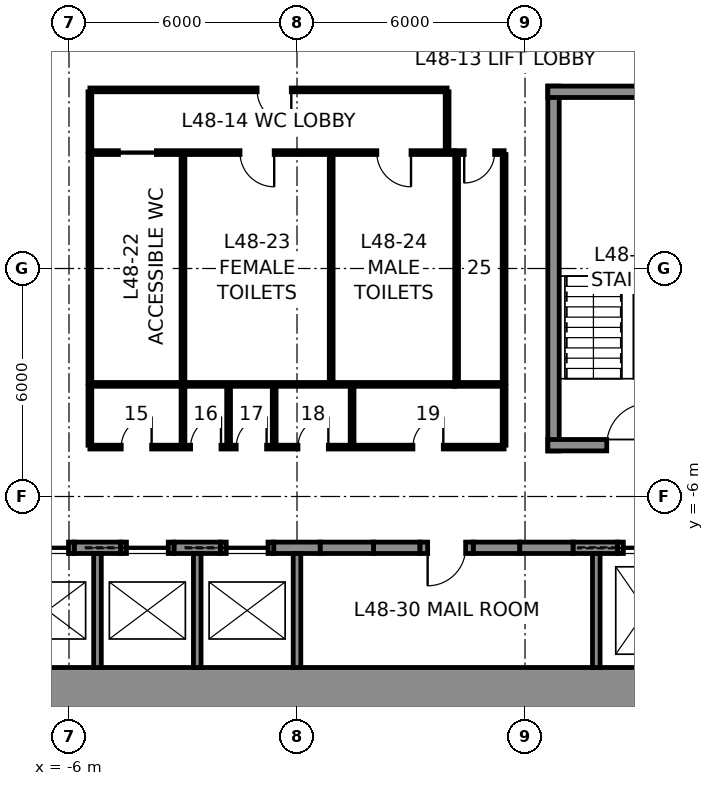
"""IFC4 building model, lengths in metres.
Left out: names, types, materials, properties, quantities, classifications, styles, units other than length and angle.
Written with IfcOpenShell. Run it as: python <this file> out.ifc"""

import sys

from ifc_helpers import new_model, si_unit, direction, frame, frame_2d, origin, place, context, subcontext, project, spatial, rectangle, extrude, element, fill, save


model = new_model("IFC4")
c1 = context("Model", 3, precision=1e-05, world=origin(), true_north=direction((0.0, 1.0)))
c2 = subcontext(c1, "Body", "Model", "MODEL_VIEW")
j1 = project(units=[si_unit("LENGTHUNIT", "METRE"), si_unit("PLANEANGLEUNIT", "RADIAN")], contexts=[c1])
p1 = place(None, origin())
s1 = spatial("IfcSite", under=j1, at=p1, CompositionType="ELEMENT")
p2 = place(p1, origin())
s2 = spatial("IfcBuilding", under=s1, at=p2, CompositionType="ELEMENT")
p3 = place(p2, frame((0.0, 0.0, 221.8)))
s3 = spatial("IfcBuildingStorey", under=s2, at=p3, CompositionType="ELEMENT", Elevation=221.8)
p4 = place(p3, frame((12.0, -11.25, 0.0), z_axis=(0.0, 0.0, 1.0), x_axis=(-1.0, 0.0, 0.0)))
e1 = element("IfcWall", 1, at=p4, inside=s3, PredefinedType="SHEAR", context=c2, shape_type="SweptSolid", body=[
    extrude(rectangle(XDim=24.0, YDim=1.5, at=frame_2d((12.0, 0.0))), origin(), (0.0, 0.0, 1.0), 4.0),
])
for number, where, z_axis, x_axis in (
    (2, (-5.863, -7.35, 0.0), (0.0, 0.0, 1.0), (1.0, 0.0, 0.0)),
    (3, (-3.238, -7.35, 0.0), (0.0, 0.0, 1.0), (1.0, 0.0, 0.0)),
    (4, (-0.613, -7.35, 0.0), (0.0, 0.0, 1.0), (1.0, 0.0, 0.0)),
    (5, (2.012, -7.35, 0.0), (0.0, 0.0, 1.0), (1.0, 0.0, 0.0)),
    (6, (4.637, -7.35, 0.0), (0.0, 0.0, 1.0), (1.0, 0.0, 0.0)),
):
    element("IfcWall", number, at=place(p3, frame(where, z_axis=z_axis, x_axis=x_axis)), inside=s3, PredefinedType="SHEAR", context=c2, shape_type="SweptSolid", body=[
        extrude(rectangle(XDim=1.225, YDim=0.3, at=frame_2d((0.613, 0.0))), origin(), (0.0, 0.0, 1.0), 4.0),
    ])
p5 = place(p3, frame((7.262, -7.35, 0.0), z_axis=(0.0, 0.0, 1.0), x_axis=(1.0, 0.0, 0.0)))
e7 = element("IfcWall", 7, at=p5, inside=s3, PredefinedType="SHEAR", context=c2, shape_type="SweptSolid", body=[
    extrude(rectangle(XDim=1.175, YDim=0.3, at=frame_2d((0.587, 0.0))), origin(), (0.0, 0.0, 1.0), 4.0),
])
p6 = place(p3, frame((-7.262, -7.35, 0.0), z_axis=(0.0, 0.0, 1.0), x_axis=(1.0, 0.0, 0.0)))
e8 = element("IfcWall", 8, at=p6, inside=s3, PredefinedType="PARTITIONING", context=c2, shape_type="SweptSolid", body=[
    extrude(rectangle(XDim=1.4, YDim=0.3, at=frame_2d((0.7, 0.0))), origin(), (0.0, 0.0, 1.0), 4.0),
])
p7 = place(p6, frame((0.15, 0.0, 0.0)))
e9 = element("IfcOpeningElement", 9, at=p7, cuts=e8, PredefinedType="OPENING", context=c2, shape_type="SweptSolid", body=[
    extrude(rectangle(XDim=1.1, YDim=2.3, at=frame_2d((0.55, 1.15))), frame((0.0, 0.16, 0.0), z_axis=(0.0, -1.0, 0.0), x_axis=(1.0, 0.0, 0.0)), (0.0, 0.0, 1.0), 0.32),
])
p8 = place(p3, frame((-4.637, -7.35, 0.0), z_axis=(0.0, 0.0, 1.0), x_axis=(1.0, 0.0, 0.0)))
e10 = element("IfcWall", 10, at=p8, inside=s3, PredefinedType="PARTITIONING", context=c2, shape_type="SweptSolid", body=[
    extrude(rectangle(XDim=1.4, YDim=0.3, at=frame_2d((0.7, 0.0))), origin(), (0.0, 0.0, 1.0), 4.0),
])
p9 = place(p8, frame((0.15, 0.0, 0.0)))
e11 = element("IfcOpeningElement", 11, at=p9, cuts=e10, PredefinedType="OPENING", context=c2, shape_type="SweptSolid", body=[
    extrude(rectangle(XDim=1.1, YDim=2.3, at=frame_2d((0.55, 1.15))), frame((0.0, 0.16, 0.0), z_axis=(0.0, -1.0, 0.0), x_axis=(1.0, 0.0, 0.0)), (0.0, 0.0, 1.0), 0.32),
])
p10 = place(p3, frame((-2.012, -7.35, 0.0), z_axis=(0.0, 0.0, 1.0), x_axis=(1.0, 0.0, 0.0)))
e12 = element("IfcWall", 12, at=p10, inside=s3, PredefinedType="PARTITIONING", context=c2, shape_type="SweptSolid", body=[
    extrude(rectangle(XDim=1.4, YDim=0.3, at=frame_2d((0.7, 0.0))), origin(), (0.0, 0.0, 1.0), 4.0),
])
p11 = place(p10, frame((0.15, 0.0, 0.0)))
e13 = element("IfcOpeningElement", 13, at=p11, cuts=e12, PredefinedType="OPENING", context=c2, shape_type="SweptSolid", body=[
    extrude(rectangle(XDim=1.1, YDim=2.3, at=frame_2d((0.55, 1.15))), frame((0.0, 0.16, 0.0), z_axis=(0.0, -1.0, 0.0), x_axis=(1.0, 0.0, 0.0)), (0.0, 0.0, 1.0), 0.32),
])
p12 = place(p3, frame((0.613, -7.35, 0.0), z_axis=(0.0, 0.0, 1.0), x_axis=(1.0, 0.0, 0.0)))
e14 = element("IfcWall", 14, at=p12, inside=s3, PredefinedType="PARTITIONING", context=c2, shape_type="SweptSolid", body=[
    extrude(rectangle(XDim=1.4, YDim=0.3, at=frame_2d((0.7, 0.0))), origin(), (0.0, 0.0, 1.0), 4.0),
])
p13 = place(p3, frame((3.238, -7.35, 0.0), z_axis=(0.0, 0.0, 1.0), x_axis=(1.0, 0.0, 0.0)))
e15 = element("IfcWall", 15, at=p13, inside=s3, PredefinedType="PARTITIONING", context=c2, shape_type="SweptSolid", body=[
    extrude(rectangle(XDim=1.4, YDim=0.3, at=frame_2d((0.7, 0.0))), origin(), (0.0, 0.0, 1.0), 4.0),
])
p14 = place(p13, frame((0.2, 0.0, 0.0)))
e16 = element("IfcOpeningElement", 16, at=p14, cuts=e15, PredefinedType="OPENING", context=c2, shape_type="SweptSolid", body=[
    extrude(rectangle(XDim=1.0, YDim=2.3, at=frame_2d((0.5, 1.15))), frame((0.0, 0.16, 0.0), z_axis=(0.0, -1.0, 0.0), x_axis=(1.0, 0.0, 0.0)), (0.0, 0.0, 1.0), 0.32),
])
p15 = place(p3, frame((5.863, -7.35, 0.0), z_axis=(0.0, 0.0, 1.0), x_axis=(1.0, 0.0, 0.0)))
e17 = element("IfcWall", 17, at=p15, inside=s3, PredefinedType="PARTITIONING", context=c2, shape_type="SweptSolid", body=[
    extrude(rectangle(XDim=1.4, YDim=0.3, at=frame_2d((0.7, 0.0))), origin(), (0.0, 0.0, 1.0), 4.0),
])
p16 = place(p3, frame((8.438, -7.35, 0.0), z_axis=(0.0, 0.0, 1.0), x_axis=(1.0, 0.0, 0.0)))
e18 = element("IfcWall", 18, at=p16, inside=s3, PredefinedType="PARTITIONING", context=c2, shape_type="SweptSolid", body=[
    extrude(rectangle(XDim=1.5, YDim=0.3, at=frame_2d((0.75, 0.0))), origin(), (0.0, 0.0, 1.0), 4.0),
])
p17 = place(p16, frame((0.15, 0.0, 0.0)))
e19 = element("IfcOpeningElement", 19, at=p17, cuts=e18, PredefinedType="OPENING", context=c2, shape_type="SweptSolid", body=[
    extrude(rectangle(XDim=1.2, YDim=2.3, at=frame_2d((0.6, 1.15))), frame((0.0, 0.16, 0.0), z_axis=(0.0, -1.0, 0.0), x_axis=(1.0, 0.0, 0.0)), (0.0, 0.0, 1.0), 0.32),
])
for number, where, z_axis, x_axis in (
    (20, (-5.25, -10.5, 0.0), (0.0, 0.0, 1.0), (0.0, 1.0, 0.0)),
    (21, (-2.625, -10.5, 0.0), (0.0, 0.0, 1.0), (0.0, 1.0, 0.0)),
    (22, (0.0, -10.5, 0.0), (0.0, 0.0, 1.0), (0.0, 1.0, 0.0)),
    (23, (7.875, -10.5, 0.0), (0.0, 0.0, 1.0), (0.0, 1.0, 0.0)),
):
    element("IfcWall", number, at=place(p3, frame(where, z_axis=z_axis, x_axis=x_axis)), inside=s3, PredefinedType="PARTITIONING", context=c2, shape_type="SweptSolid", body=[
        extrude(rectangle(XDim=3.0, YDim=0.2, at=frame_2d((1.5, 0.0))), origin(), (0.0, 0.0, 1.0), 4.0),
    ])
p18 = place(p3, frame((6.75, -4.8, 0.0), z_axis=(0.0, 0.0, 1.0), x_axis=(0.0, 1.0, 0.0)))
e24 = element("IfcWall", 24, at=p18, inside=s3, PredefinedType="SOLIDWALL", context=c2, shape_type="SweptSolid", body=[
    extrude(rectangle(XDim=9.6, YDim=0.3, at=frame_2d((4.8, 0.0))), origin(), (0.0, 0.0, 1.0), 3.75),
])
p19 = place(p3, frame((6.6, 4.65, 0.0), z_axis=(0.0, 0.0, 1.0), x_axis=(1.0, 0.0, 0.0)))
e25 = element("IfcWall", 25, at=p19, inside=s3, PredefinedType="SOLIDWALL", context=c2, shape_type="SweptSolid", body=[
    extrude(rectangle(XDim=3.9, YDim=0.3, at=frame_2d((1.95, 0.0))), origin(), (0.0, 0.0, 1.0), 3.75),
])
p20 = place(p3, frame((10.5, -4.65, 0.0), z_axis=(0.0, 0.0, 1.0), x_axis=(-1.0, 0.0, 0.0)))
e26 = element("IfcWall", 26, at=p20, inside=s3, PredefinedType="SOLIDWALL", context=c2, shape_type="SweptSolid", body=[
    extrude(rectangle(XDim=3.9, YDim=0.3, at=frame_2d((1.95, 0.0))), origin(), (0.0, 0.0, 1.0), 3.75),
])
p21 = place(p20, frame((1.25, 0.0, 0.0)))
e27 = element("IfcOpeningElement", 27, at=p21, cuts=e26, PredefinedType="OPENING", context=c2, shape_type="SweptSolid", body=[
    extrude(rectangle(XDim=1.1, YDim=2.3, at=frame_2d((0.55, 1.15))), frame((0.0, 0.16, 0.0), z_axis=(0.0, -1.0, 0.0), x_axis=(1.0, 0.0, 0.0)), (0.0, 0.0, 1.0), 0.32),
])
p22 = place(p3, frame((-5.45, 3.05, 0.0), z_axis=(0.0, 0.0, 1.0), x_axis=(1.0, 0.0, 0.0)))
e28 = element("IfcWall", 28, at=p22, inside=s3, PredefinedType="PARTITIONING", context=c2, shape_type="SweptSolid", body=[
    extrude(rectangle(XDim=9.6, YDim=0.1, at=frame_2d((4.8, 0.0))), origin(), (0.0, 0.0, 1.0), 3.75),
])
p23 = place(p22, frame((0.75, 0.0, 0.0)))
e29 = element("IfcOpeningElement", 29, at=p23, cuts=e28, PredefinedType="OPENING", context=c2, shape_type="SweptSolid", body=[
    extrude(rectangle(XDim=1.0, YDim=2.3, at=frame_2d((0.5, 1.15))), frame((0.0, 0.06, 0.0), z_axis=(0.0, -1.0, 0.0), x_axis=(1.0, 0.0, 0.0)), (0.0, 0.0, 1.0), 0.12),
])
p24 = place(p22, frame((3.95, 0.0, 0.0)))
e30 = element("IfcOpeningElement", 30, at=p24, cuts=e28, PredefinedType="OPENING", context=c2, shape_type="SweptSolid", body=[
    extrude(rectangle(XDim=0.9, YDim=2.3, at=frame_2d((0.45, 1.15))), frame((0.0, 0.06, 0.0), z_axis=(0.0, -1.0, 0.0), x_axis=(1.0, 0.0, 0.0)), (0.0, 0.0, 1.0), 0.12),
])
p25 = place(p22, frame((7.55, 0.0, 0.0)))
e31 = element("IfcOpeningElement", 31, at=p25, cuts=e28, PredefinedType="OPENING", context=c2, shape_type="SweptSolid", body=[
    extrude(rectangle(XDim=0.9, YDim=2.3, at=frame_2d((0.45, 1.15))), frame((0.0, 0.06, 0.0), z_axis=(0.0, -1.0, 0.0), x_axis=(1.0, 0.0, 0.0)), (0.0, 0.0, 1.0), 0.12),
])
p26 = place(p3, frame((4.15, 3.05, 0.0), z_axis=(0.0, 0.0, 1.0), x_axis=(1.0, 0.0, 0.0)))
e32 = element("IfcWall", 32, at=p26, inside=s3, PredefinedType="PARTITIONING", context=c2, shape_type="SweptSolid", body=[
    extrude(rectangle(XDim=1.3, YDim=0.1, at=frame_2d((0.65, 0.0))), origin(), (0.0, 0.0, 1.0), 3.75),
])
p27 = place(p26, frame((0.25, 0.0, 0.0)))
e33 = element("IfcOpeningElement", 33, at=p27, cuts=e32, PredefinedType="OPENING", context=c2, shape_type="SweptSolid", body=[
    extrude(rectangle(XDim=0.8, YDim=2.3, at=frame_2d((0.4, 1.15))), frame((0.0, 0.06, 0.0), z_axis=(0.0, -1.0, 0.0), x_axis=(1.0, 0.0, 0.0)), (0.0, 0.0, 1.0), 0.12),
])
p28 = place(p3, frame((4.15, -3.05, 0.0), z_axis=(0.0, 0.0, 1.0), x_axis=(-1.0, 0.0, 0.0)))
e34 = element("IfcWall", 34, at=p28, inside=s3, PredefinedType="PARTITIONING", context=c2, shape_type="SweptSolid", body=[
    extrude(rectangle(XDim=9.6, YDim=0.1, at=frame_2d((4.8, 0.0))), origin(), (0.0, 0.0, 1.0), 3.75),
])
p29 = place(p3, frame((5.45, -3.05, 0.0), z_axis=(0.0, 0.0, 1.0), x_axis=(-1.0, 0.0, 0.0)))
e35 = element("IfcWall", 35, at=p29, inside=s3, PredefinedType="PARTITIONING", context=c2, shape_type="SweptSolid", body=[
    extrude(rectangle(XDim=1.3, YDim=0.1, at=frame_2d((0.65, 0.0))), origin(), (0.0, 0.0, 1.0), 3.75),
])
for number, where, z_axis, x_axis in (
    (36, (5.45, 3.0, 0.0), (0.0, 0.0, 1.0), (0.0, -1.0, 0.0)),
    (37, (-5.45, -3.0, 0.0), (0.0, 0.0, 1.0), (0.0, 1.0, 0.0)),
    (38, (-3.0, -3.0, 0.0), (0.0, 0.0, 1.0), (0.0, 1.0, 0.0)),
    (39, (0.9, -3.0, 0.0), (0.0, 0.0, 1.0), (0.0, 1.0, 0.0)),
    (40, (4.2, -3.0, 0.0), (0.0, 0.0, 1.0), (0.0, 1.0, 0.0)),
):
    element("IfcWall", number, at=place(p3, frame(where, z_axis=z_axis, x_axis=x_axis)), inside=s3, PredefinedType="PARTITIONING", context=c2, shape_type="SweptSolid", body=[
        extrude(rectangle(XDim=6.0, YDim=0.1, at=frame_2d((3.0, 0.0))), origin(), (0.0, 0.0, 1.0), 3.75),
    ])
p30 = place(p3, frame((-5.45, 4.7, 0.0), z_axis=(0.0, 0.0, 1.0), x_axis=(1.0, 0.0, 0.0)))
e41 = element("IfcWall", 41, at=p30, inside=s3, PredefinedType="PARTITIONING", context=c2, shape_type="SweptSolid", body=[
    extrude(rectangle(XDim=9.4, YDim=0.1, at=frame_2d((4.7, 0.0))), origin(), (0.0, 0.0, 1.0), 3.75),
])
p31 = place(p30, frame((4.4, 0.0, 0.0)))
e42 = element("IfcOpeningElement", 42, at=p31, cuts=e41, PredefinedType="OPENING", context=c2, shape_type="SweptSolid", body=[
    extrude(rectangle(XDim=0.9, YDim=2.3, at=frame_2d((0.45, 1.15))), frame((0.0, 0.06, 0.0), z_axis=(0.0, -1.0, 0.0), x_axis=(1.0, 0.0, 0.0)), (0.0, 0.0, 1.0), 0.12),
])
for number, where, z_axis, x_axis in (
    (43, (-5.45, 3.1, 0.0), (0.0, 0.0, 1.0), (0.0, 1.0, 0.0)),
    (44, (3.95, 3.1, 0.0), (0.0, 0.0, 1.0), (0.0, 1.0, 0.0)),
):
    element("IfcWall", number, at=place(p3, frame(where, z_axis=z_axis, x_axis=x_axis)), inside=s3, PredefinedType="PARTITIONING", context=c2, shape_type="SweptSolid", body=[
        extrude(rectangle(XDim=1.55, YDim=0.1, at=frame_2d((0.775, 0.0))), origin(), (0.0, 0.0, 1.0), 3.75),
    ])
p32 = place(p3, frame((5.45, -4.7, 0.0), z_axis=(0.0, 0.0, 1.0), x_axis=(-1.0, 0.0, 0.0)))
e45 = element("IfcWall", 45, at=p32, inside=s3, PredefinedType="PARTITIONING", context=c2, shape_type="SweptSolid", body=[
    extrude(rectangle(XDim=10.9, YDim=0.1, at=frame_2d((5.45, 0.0))), origin(), (0.0, 0.0, 1.0), 3.75),
])
p33 = place(p32, frame((9.275, 0.0, 0.0)))
e46 = element("IfcOpeningElement", 46, at=p33, cuts=e45, PredefinedType="OPENING", context=c2, shape_type="SweptSolid", body=[
    extrude(rectangle(XDim=0.8, YDim=2.3, at=frame_2d((0.4, 1.15))), frame((0.0, 0.06, 0.0), z_axis=(0.0, -1.0, 0.0), x_axis=(1.0, 0.0, 0.0)), (0.0, 0.0, 1.0), 0.12),
])
p34 = place(p32, frame((7.45, 0.0, 0.0)))
e47 = element("IfcOpeningElement", 47, at=p34, cuts=e45, PredefinedType="OPENING", context=c2, shape_type="SweptSolid", body=[
    extrude(rectangle(XDim=0.8, YDim=2.3, at=frame_2d((0.4, 1.15))), frame((0.0, 0.06, 0.0), z_axis=(0.0, -1.0, 0.0), x_axis=(1.0, 0.0, 0.0)), (0.0, 0.0, 1.0), 0.12),
])
p35 = place(p32, frame((6.25, 0.0, 0.0)))
e48 = element("IfcOpeningElement", 48, at=p35, cuts=e45, PredefinedType="OPENING", context=c2, shape_type="SweptSolid", body=[
    extrude(rectangle(XDim=0.8, YDim=2.3, at=frame_2d((0.4, 1.15))), frame((0.0, 0.06, 0.0), z_axis=(0.0, -1.0, 0.0), x_axis=(1.0, 0.0, 0.0)), (0.0, 0.0, 1.0), 0.12),
])
p36 = place(p32, frame((4.625, 0.0, 0.0)))
e49 = element("IfcOpeningElement", 49, at=p36, cuts=e45, PredefinedType="OPENING", context=c2, shape_type="SweptSolid", body=[
    extrude(rectangle(XDim=0.8, YDim=2.3, at=frame_2d((0.4, 1.15))), frame((0.0, 0.06, 0.0), z_axis=(0.0, -1.0, 0.0), x_axis=(1.0, 0.0, 0.0)), (0.0, 0.0, 1.0), 0.12),
])
p37 = place(p32, frame((1.6, 0.0, 0.0)))
e50 = element("IfcOpeningElement", 50, at=p37, cuts=e45, PredefinedType="OPENING", context=c2, shape_type="SweptSolid", body=[
    extrude(rectangle(XDim=0.8, YDim=2.3, at=frame_2d((0.4, 1.15))), frame((0.0, 0.06, 0.0), z_axis=(0.0, -1.0, 0.0), x_axis=(1.0, 0.0, 0.0)), (0.0, 0.0, 1.0), 0.12),
])
for number, where, z_axis, x_axis in (
    (51, (-5.45, -3.1, 0.0), (0.0, 0.0, 1.0), (0.0, -1.0, 0.0)),
    (52, (5.45, -3.1, 0.0), (0.0, 0.0, 1.0), (0.0, -1.0, 0.0)),
    (53, (-3.0, -3.1, 0.0), (0.0, 0.0, 1.0), (0.0, -1.0, 0.0)),
    (54, (-1.8, -3.1, 0.0), (0.0, 0.0, 1.0), (0.0, -1.0, 0.0)),
    (55, (-0.6, -3.1, 0.0), (0.0, 0.0, 1.0), (0.0, -1.0, 0.0)),
    (56, (1.45, -3.1, 0.0), (0.0, 0.0, 1.0), (0.0, -1.0, 0.0)),
):
    element("IfcWall", number, at=place(p3, frame(where, z_axis=z_axis, x_axis=x_axis)), inside=s3, PredefinedType="PARTITIONING", context=c2, shape_type="SweptSolid", body=[
        extrude(rectangle(XDim=1.55, YDim=0.1, at=frame_2d((0.775, 0.0))), origin(), (0.0, 0.0, 1.0), 3.75),
    ])
p38 = place(p21, frame((1.1, 0.0, 0.0), z_axis=(0.0, 0.0, 1.0), x_axis=(-1.0, 0.0, 0.0)))
e57 = element("IfcDoor", 57, at=p38, inside=s3, OperationType="SINGLE_SWING_RIGHT", PredefinedType="DOOR", context=c2, shape_type="SweptSolid", body=[
    extrude(rectangle(XDim=1.1, YDim=2.3, at=frame_2d((0.55, 1.15))), frame((0.0, 0.025, 0.0), z_axis=(0.0, -1.0, 0.0), x_axis=(1.0, 0.0, 0.0)), (0.0, 0.0, 1.0), 0.05),
])
fill(e27, e57)
p39 = place(p23, frame((1.0, 0.0, 0.0), z_axis=(0.0, 0.0, 1.0), x_axis=(-1.0, 0.0, 0.0)))
e58 = element("IfcDoor", 58, at=p39, inside=s3, OperationType="SLIDING_TO_LEFT", PredefinedType="DOOR", context=c2, shape_type="SweptSolid", body=[
    extrude(rectangle(XDim=1.0, YDim=2.3, at=frame_2d((0.5, 1.15))), frame((0.0, 0.025, 0.0), z_axis=(0.0, -1.0, 0.0), x_axis=(1.0, 0.0, 0.0)), (0.0, 0.0, 1.0), 0.05),
])
fill(e29, e58)
p40 = place(p24, frame((0.9, 0.0, 0.0), z_axis=(0.0, 0.0, 1.0), x_axis=(-1.0, 0.0, 0.0)))
e59 = element("IfcDoor", 59, at=p40, inside=s3, OperationType="SINGLE_SWING_LEFT", PredefinedType="DOOR", context=c2, shape_type="SweptSolid", body=[
    extrude(rectangle(XDim=0.9, YDim=2.3, at=frame_2d((0.45, 1.15))), frame((0.0, 0.025, 0.0), z_axis=(0.0, -1.0, 0.0), x_axis=(1.0, 0.0, 0.0)), (0.0, 0.0, 1.0), 0.05),
])
fill(e30, e59)
p41 = place(p25, frame((0.9, 0.0, 0.0), z_axis=(0.0, 0.0, 1.0), x_axis=(-1.0, 0.0, 0.0)))
e60 = element("IfcDoor", 60, at=p41, inside=s3, OperationType="SINGLE_SWING_LEFT", PredefinedType="DOOR", context=c2, shape_type="SweptSolid", body=[
    extrude(rectangle(XDim=0.9, YDim=2.3, at=frame_2d((0.45, 1.15))), frame((0.0, 0.025, 0.0), z_axis=(0.0, -1.0, 0.0), x_axis=(1.0, 0.0, 0.0)), (0.0, 0.0, 1.0), 0.05),
])
fill(e31, e60)
p42 = place(p27, frame((0.8, 0.0, 0.0), z_axis=(0.0, 0.0, 1.0), x_axis=(-1.0, 0.0, 0.0)))
e61 = element("IfcDoor", 61, at=p42, inside=s3, OperationType="SINGLE_SWING_RIGHT", PredefinedType="DOOR", context=c2, shape_type="SweptSolid", body=[
    extrude(rectangle(XDim=0.8, YDim=2.3, at=frame_2d((0.4, 1.15))), frame((0.0, 0.025, 0.0), z_axis=(0.0, -1.0, 0.0), x_axis=(1.0, 0.0, 0.0)), (0.0, 0.0, 1.0), 0.05),
])
fill(e33, e61)
p43 = place(p31, frame((0.9, 0.0, 0.0), z_axis=(0.0, 0.0, 1.0), x_axis=(-1.0, 0.0, 0.0)))
e62 = element("IfcDoor", 62, at=p43, inside=s3, OperationType="SINGLE_SWING_LEFT", PredefinedType="DOOR", context=c2, shape_type="SweptSolid", body=[
    extrude(rectangle(XDim=0.9, YDim=2.3, at=frame_2d((0.45, 1.15))), frame((0.0, 0.025, 0.0), z_axis=(0.0, -1.0, 0.0), x_axis=(1.0, 0.0, 0.0)), (0.0, 0.0, 1.0), 0.05),
])
fill(e42, e62)
p44 = place(p33, frame((0.8, 0.0, 0.0), z_axis=(0.0, 0.0, 1.0), x_axis=(-1.0, 0.0, 0.0)))
e63 = element("IfcDoor", 63, at=p44, inside=s3, OperationType="SINGLE_SWING_RIGHT", PredefinedType="DOOR", context=c2, shape_type="SweptSolid", body=[
    extrude(rectangle(XDim=0.8, YDim=2.3, at=frame_2d((0.4, 1.15))), frame((0.0, 0.025, 0.0), z_axis=(0.0, -1.0, 0.0), x_axis=(1.0, 0.0, 0.0)), (0.0, 0.0, 1.0), 0.05),
])
fill(e46, e63)
p45 = place(p34, frame((0.8, 0.0, 0.0), z_axis=(0.0, 0.0, 1.0), x_axis=(-1.0, 0.0, 0.0)))
e64 = element("IfcDoor", 64, at=p45, inside=s3, OperationType="SINGLE_SWING_RIGHT", PredefinedType="DOOR", context=c2, shape_type="SweptSolid", body=[
    extrude(rectangle(XDim=0.8, YDim=2.3, at=frame_2d((0.4, 1.15))), frame((0.0, 0.025, 0.0), z_axis=(0.0, -1.0, 0.0), x_axis=(1.0, 0.0, 0.0)), (0.0, 0.0, 1.0), 0.05),
])
fill(e47, e64)
p46 = place(p35, frame((0.8, 0.0, 0.0), z_axis=(0.0, 0.0, 1.0), x_axis=(-1.0, 0.0, 0.0)))
e65 = element("IfcDoor", 65, at=p46, inside=s3, OperationType="SINGLE_SWING_RIGHT", PredefinedType="DOOR", context=c2, shape_type="SweptSolid", body=[
    extrude(rectangle(XDim=0.8, YDim=2.3, at=frame_2d((0.4, 1.15))), frame((0.0, 0.025, 0.0), z_axis=(0.0, -1.0, 0.0), x_axis=(1.0, 0.0, 0.0)), (0.0, 0.0, 1.0), 0.05),
])
fill(e48, e65)
p47 = place(p36, frame((0.8, 0.0, 0.0), z_axis=(0.0, 0.0, 1.0), x_axis=(-1.0, 0.0, 0.0)))
e66 = element("IfcDoor", 66, at=p47, inside=s3, OperationType="SINGLE_SWING_RIGHT", PredefinedType="DOOR", context=c2, shape_type="SweptSolid", body=[
    extrude(rectangle(XDim=0.8, YDim=2.3, at=frame_2d((0.4, 1.15))), frame((0.0, 0.025, 0.0), z_axis=(0.0, -1.0, 0.0), x_axis=(1.0, 0.0, 0.0)), (0.0, 0.0, 1.0), 0.05),
])
fill(e49, e66)
p48 = place(p37, frame((0.8, 0.0, 0.0), z_axis=(0.0, 0.0, 1.0), x_axis=(-1.0, 0.0, 0.0)))
e67 = element("IfcDoor", 67, at=p48, inside=s3, OperationType="SINGLE_SWING_RIGHT", PredefinedType="DOOR", context=c2, shape_type="SweptSolid", body=[
    extrude(rectangle(XDim=0.8, YDim=2.3, at=frame_2d((0.4, 1.15))), frame((0.0, 0.025, 0.0), z_axis=(0.0, -1.0, 0.0), x_axis=(1.0, 0.0, 0.0)), (0.0, 0.0, 1.0), 0.05),
])
fill(e50, e67)
p49 = place(p14, frame((1.0, 0.0, 0.0), z_axis=(0.0, 0.0, 1.0), x_axis=(-1.0, 0.0, 0.0)))
e68 = element("IfcDoor", 68, at=p49, inside=s3, OperationType="SINGLE_SWING_RIGHT", PredefinedType="DOOR", context=c2, shape_type="SweptSolid", body=[
    extrude(rectangle(XDim=1.0, YDim=2.3, at=frame_2d((0.5, 1.15))), frame((0.0, 0.025, 0.0), z_axis=(0.0, -1.0, 0.0), x_axis=(1.0, 0.0, 0.0)), (0.0, 0.0, 1.0), 0.05),
])
fill(e16, e68)
p50 = place(p17, origin())
e69 = element("IfcDoor", 69, at=p50, inside=s3, OperationType="SLIDING_TO_LEFT", PredefinedType="DOOR", context=c2, shape_type="SweptSolid", body=[
    extrude(rectangle(XDim=1.2, YDim=2.3, at=frame_2d((0.6, 1.15))), frame((0.0, 0.025, 0.0), z_axis=(0.0, -1.0, 0.0), x_axis=(1.0, 0.0, 0.0)), (0.0, 0.0, 1.0), 0.05),
])
fill(e19, e69)
p51 = place(p11, origin())
e70 = element("IfcDoor", 70, at=p51, inside=s3, OperationType="SLIDING_TO_LEFT", PredefinedType="DOOR", context=c2, shape_type="SweptSolid", body=[
    extrude(rectangle(XDim=1.1, YDim=2.3, at=frame_2d((0.55, 1.15))), frame((0.0, 0.025, 0.0), z_axis=(0.0, -1.0, 0.0), x_axis=(1.0, 0.0, 0.0)), (0.0, 0.0, 1.0), 0.05),
])
fill(e13, e70)
p52 = place(p9, origin())
e71 = element("IfcDoor", 71, at=p52, inside=s3, OperationType="SLIDING_TO_LEFT", PredefinedType="DOOR", context=c2, shape_type="SweptSolid", body=[
    extrude(rectangle(XDim=1.1, YDim=2.3, at=frame_2d((0.55, 1.15))), frame((0.0, 0.025, 0.0), z_axis=(0.0, -1.0, 0.0), x_axis=(1.0, 0.0, 0.0)), (0.0, 0.0, 1.0), 0.05),
])
fill(e11, e71)
p53 = place(p7, origin())
e72 = element("IfcDoor", 72, at=p53, inside=s3, OperationType="SLIDING_TO_LEFT", PredefinedType="DOOR", context=c2, shape_type="SweptSolid", body=[
    extrude(rectangle(XDim=1.1, YDim=2.3, at=frame_2d((0.55, 1.15))), frame((0.0, 0.025, 0.0), z_axis=(0.0, -1.0, 0.0), x_axis=(1.0, 0.0, 0.0)), (0.0, 0.0, 1.0), 0.05),
])
fill(e9, e72)
save(model, sys.argv[1])
